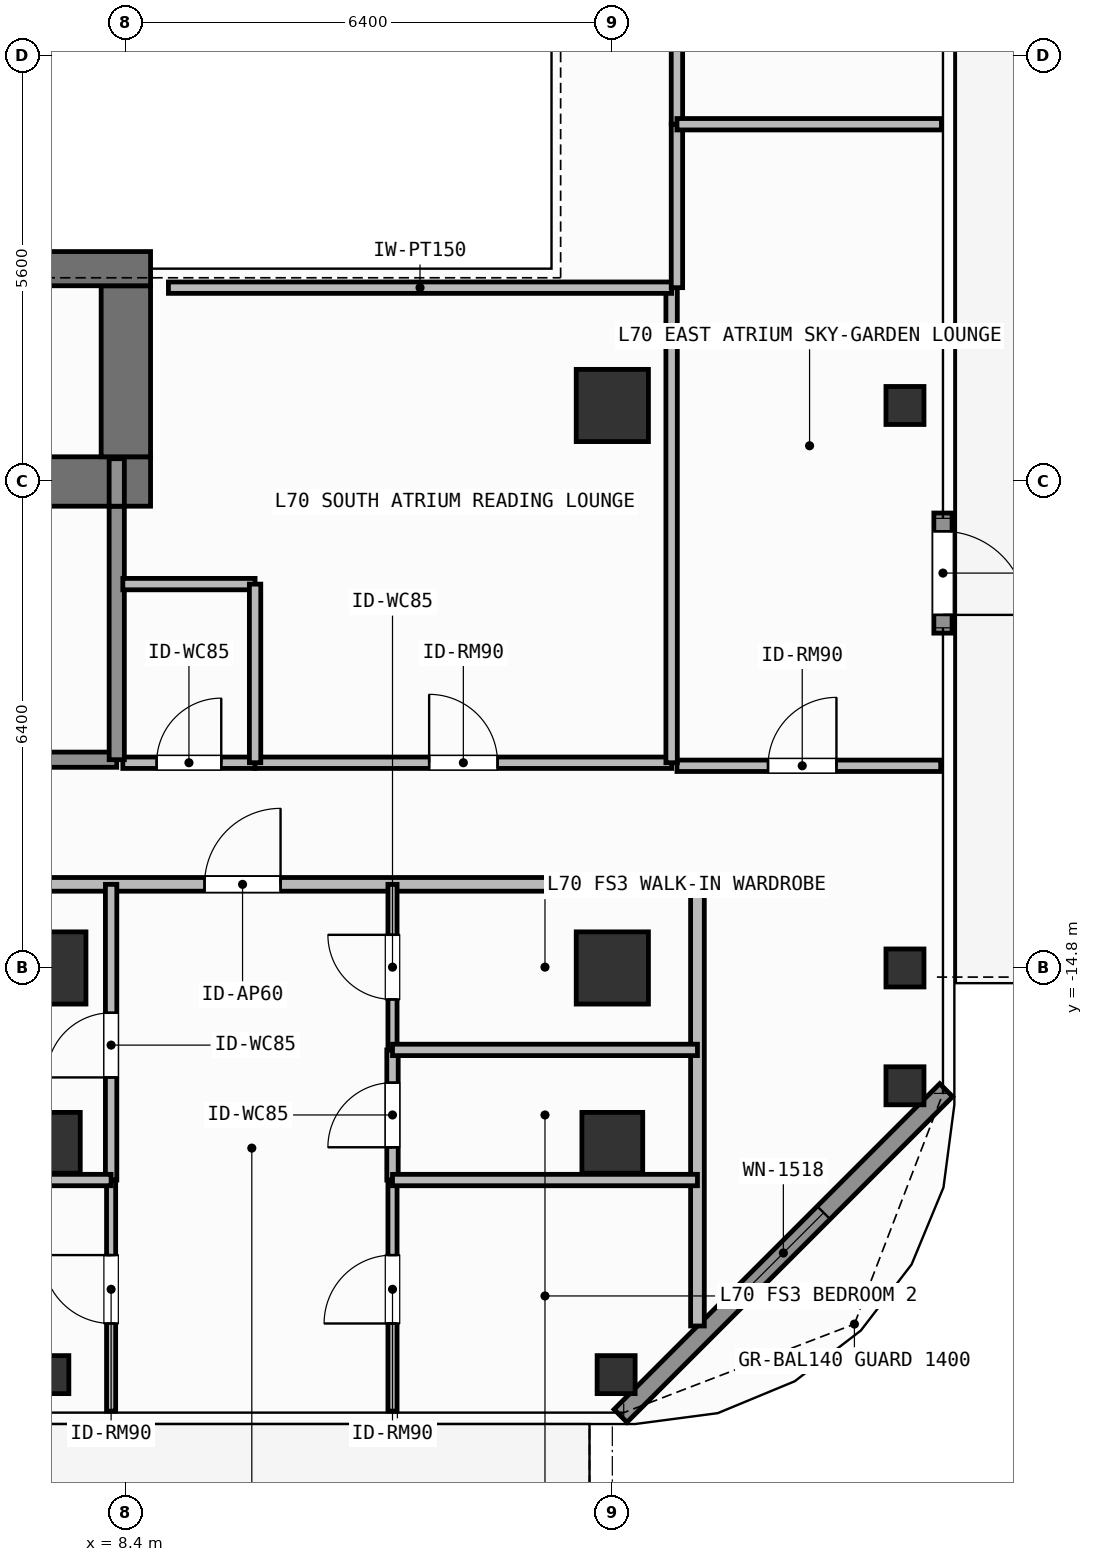
"""IFC4 building model, lengths in metres.
Left out: names, types, materials, properties, quantities, classifications, styles, units other than length and angle.
Written with IfcOpenShell. Run it as: python <this file> out.ifc"""

import sys

from ifc_helpers import new_model, si_unit, direction, frame, frame_2d, origin, origin_2d, place, context, subcontext, project, spatial, rectangle, hollow_rectangle, extrude, element, fill, save


model = new_model("IFC4")
c1 = context("Model", 3, precision=1e-05, world=origin(), true_north=direction((0.0, 1.0)))
c2 = subcontext(c1, "Body", "Model", "MODEL_VIEW")
j1 = project(units=[si_unit("LENGTHUNIT", "METRE"), si_unit("PLANEANGLEUNIT", "RADIAN")], contexts=[c1])
p1 = place(None, origin())
s1 = spatial("IfcSite", under=j1, at=p1, CompositionType="ELEMENT")
p2 = place(p1, origin())
s2 = spatial("IfcBuilding", under=s1, at=p2, CompositionType="ELEMENT")
p3 = place(p2, frame((0.0, 0.0, 285.9)))
s3 = spatial("IfcBuildingStorey", under=s2, at=p3, CompositionType="ELEMENT", Elevation=285.9)
p4 = place(p3, frame((6.12, -8.4, 0.0), z_axis=(0.0, 0.0, 1.0), x_axis=(1.0, 0.0, 0.0)))
e1 = element("IfcWall", 1, at=p4, inside=s3, PredefinedType="SHEAR", context=c2, shape_type="SweptSolid", body=[
    extrude(rectangle(XDim=2.605, YDim=0.65, at=frame_2d((1.302, 0.0))), origin(), (0.0, 0.0, 1.0), 3.9),
])
p5 = place(p3, frame((8.4, -8.075, 0.0), z_axis=(0.0, 0.0, 1.0), x_axis=(0.0, 1.0, 0.0)))
e2 = element("IfcWall", 2, at=p5, inside=s3, PredefinedType="SHEAR", context=c2, shape_type="SweptSolid", body=[
    extrude(rectangle(XDim=2.25, YDim=0.65, at=frame_2d((1.125, 0.0))), origin(), (0.0, 0.0, 1.0), 3.9),
])
p6 = place(p3, frame((3.045, -5.6, 0.0), z_axis=(0.0, 0.0, 1.0), x_axis=(1.0, 0.0, 0.0)))
e3 = element("IfcWall", 3, at=p6, inside=s3, PredefinedType="SHEAR", context=c2, shape_type="SweptSolid", body=[
    extrude(rectangle(XDim=5.68, YDim=0.45, at=frame_2d((2.84, 0.0))), origin(), (0.0, 0.0, 1.0), 3.9),
])
for number, where, z_axis, x_axis in (
    (4, (7.4, -14.8, 0.0), (0.0, 0.0, 1.0), (1.0, 0.0, 0.0)),
    (5, (14.8, -14.8, 0.0), (0.0, 0.0, 1.0), (1.0, 0.0, 0.0)),
    (6, (14.8, -7.4, 0.0), (0.0, 0.0, 1.0), (1.0, 0.0, 0.0)),
):
    element("IfcColumn", number, at=place(p3, frame(where, z_axis=z_axis, x_axis=x_axis)), inside=s3, PredefinedType="COLUMN", context=c2, shape_type="SweptSolid", body=[
        extrude(rectangle(XDim=0.95, YDim=0.95, at=origin_2d()), origin(), (0.0, 0.0, 1.0), 3.9),
    ])
for number, where, z_axis, x_axis in (
    (7, (7.4, -17.1, 0.0), (0.0, 0.0, 1.0), (1.0, 0.0, 0.0)),
    (8, (14.8, -17.1, 0.0), (0.0, 0.0, 1.0), (1.0, 0.0, 0.0)),
):
    element("IfcColumn", number, at=place(p3, frame(where, z_axis=z_axis, x_axis=x_axis)), inside=s3, PredefinedType="COLUMN", context=c2, shape_type="SweptSolid", body=[
        extrude(hollow_rectangle(XDim=0.8, YDim=0.8, WallThickness=0.036, at=origin_2d()), origin(), (0.0, 0.0, 1.0), 3.9),
    ])
for number, where, z_axis, x_axis in (
    (9, (14.85, -20.15, 0.0), (0.0, 0.0, 1.0), (1.0, 0.0, 0.0)),
    (10, (18.65, -16.35, 0.0), (0.0, 0.0, 1.0), (1.0, 0.0, 0.0)),
    (11, (7.4, -20.15, 0.0), (0.0, 0.0, 1.0), (1.0, 0.0, 0.0)),
    (12, (18.65, -14.8, 0.0), (0.0, 0.0, 1.0), (1.0, 0.0, 0.0)),
    (13, (18.65, -7.4, 0.0), (0.0, 0.0, 1.0), (1.0, 0.0, 0.0)),
):
    element("IfcColumn", number, at=place(p3, frame(where, z_axis=z_axis, x_axis=x_axis)), inside=s3, PredefinedType="COLUMN", context=c2, shape_type="SweptSolid", body=[
        extrude(hollow_rectangle(XDim=0.5, YDim=0.5, WallThickness=0.025, at=origin_2d()), origin(), (0.0, 0.0, 1.0), 3.9),
    ])
p7 = place(p3, frame((19.15, -8.815, 0.0), z_axis=(0.0, 0.0, 1.0), x_axis=(0.0, -1.0, 0.0)))
e14 = element("IfcWall", 14, at=p7, inside=s3, PredefinedType="SOLIDWALL", context=c2, shape_type="SweptSolid", body=[
    extrude(rectangle(XDim=1.58, YDim=0.24, at=frame_2d((0.79, 0.0))), origin(), (0.0, 0.0, 1.0), 3.68),
])
p8 = place(p7, frame((0.24, 0.0, 0.0)))
e15 = element("IfcOpeningElement", 15, at=p8, cuts=e14, PredefinedType="OPENING", context=c2, shape_type="SweptSolid", body=[
    extrude(rectangle(XDim=1.1, YDim=2.2, at=frame_2d((0.55, 1.1))), frame((0.0, 0.13, 0.0), z_axis=(0.0, -1.0, 0.0), x_axis=(1.0, 0.0, 0.0)), (0.0, 0.0, 1.0), 0.26),
])
p9 = place(p3, frame((19.192, -16.408, 0.0), z_axis=(0.0, 0.0, 1.0), x_axis=(-0.707106781187, -0.707106781187, 0.0)))
e16 = element("IfcWall", 16, at=p9, inside=s3, PredefinedType="SOLIDWALL", context=c2, shape_type="SweptSolid", body=[
    extrude(rectangle(XDim=6.059, YDim=0.24, at=frame_2d((3.03, 0.0))), origin(), (0.0, 0.0, 1.0), 3.68),
])
p10 = place(p9, frame((2.28, 0.0, 0.8)))
e17 = element("IfcOpeningElement", 17, at=p10, cuts=e16, PredefinedType="OPENING", context=c2, shape_type="SweptSolid", body=[
    extrude(rectangle(XDim=1.5, YDim=1.85, at=frame_2d((0.75, 0.925))), frame((0.0, 0.13, 0.0), z_axis=(0.0, -1.0, 0.0), x_axis=(1.0, 0.0, 0.0)), (0.0, 0.0, 1.0), 0.26),
])
p11 = place(p3, frame((4.58, -12.06, 0.0), z_axis=(0.0, 0.0, 1.0), x_axis=(1.0, 0.0, 0.0)))
e18 = element("IfcWall", 18, at=p11, inside=s3, PredefinedType="SOLIDWALL", context=c2, shape_type="SweptSolid", body=[
    extrude(rectangle(XDim=3.7, YDim=0.2, at=frame_2d((1.85, 0.0))), origin(), (0.0, 0.0, 1.0), 3.68),
])
p12 = place(p11, frame((1.212, 0.0, 0.0)))
e19 = element("IfcOpeningElement", 19, at=p12, cuts=e18, PredefinedType="OPENING", context=c2, shape_type="SweptSolid", body=[
    extrude(rectangle(XDim=1.1, YDim=2.15, at=frame_2d((0.55, 1.075))), frame((0.0, 0.11, 0.0), z_axis=(0.0, -1.0, 0.0), x_axis=(1.0, 0.0, 0.0)), (0.0, 0.0, 1.0), 0.22),
])
p13 = place(p3, frame((8.36, -12.1, 0.0), z_axis=(0.0, 0.0, 1.0), x_axis=(1.0, 0.0, 0.0)))
e20 = element("IfcWall", 20, at=p13, inside=s3, PredefinedType="PARTITIONING", context=c2, shape_type="SweptSolid", body=[
    extrude(rectangle(XDim=1.74, YDim=0.15, at=frame_2d((0.87, 0.0))), origin(), (0.0, 0.0, 1.0), 3.68),
])
p14 = place(p13, frame((0.445, 0.0, 0.0)))
e21 = element("IfcOpeningElement", 21, at=p14, cuts=e20, PredefinedType="OPENING", context=c2, shape_type="SweptSolid", body=[
    extrude(rectangle(XDim=0.85, YDim=2.1, at=frame_2d((0.425, 1.05))), frame((0.0, 0.085, 0.0), z_axis=(0.0, -1.0, 0.0), x_axis=(1.0, 0.0, 0.0)), (0.0, 0.0, 1.0), 0.17),
])
p15 = place(p3, frame((10.1, -12.1, 0.0), z_axis=(0.0, 0.0, 1.0), x_axis=(1.0, 0.0, 0.0)))
e22 = element("IfcWall", 22, at=p15, inside=s3, PredefinedType="PARTITIONING", context=c2, shape_type="SweptSolid", body=[
    extrude(rectangle(XDim=5.48, YDim=0.15, at=frame_2d((2.74, 0.0))), origin(), (0.0, 0.0, 1.0), 3.68),
])
p16 = place(p15, frame((2.29, 0.0, 0.0)))
e23 = element("IfcOpeningElement", 23, at=p16, cuts=e22, PredefinedType="OPENING", context=c2, shape_type="SweptSolid", body=[
    extrude(rectangle(XDim=0.9, YDim=2.1, at=frame_2d((0.45, 1.05))), frame((0.0, 0.085, 0.0), z_axis=(0.0, -1.0, 0.0), x_axis=(1.0, 0.0, 0.0)), (0.0, 0.0, 1.0), 0.17),
])
p17 = place(p3, frame((3.063, -13.7, 0.0), z_axis=(0.0, 0.0, 1.0), x_axis=(1.0, 0.0, 0.0)))
e24 = element("IfcWall", 24, at=p17, inside=s3, PredefinedType="PARTITIONING", context=c2, shape_type="SweptSolid", body=[
    extrude(rectangle(XDim=12.857, YDim=0.18, at=frame_2d((6.428, 0.0))), origin(), (0.0, 0.0, 1.0), 3.68),
])
p18 = place(p17, frame((6.372, 0.0, 0.0)))
e25 = element("IfcOpeningElement", 25, at=p18, cuts=e24, PredefinedType="OPENING", context=c2, shape_type="SweptSolid", body=[
    extrude(rectangle(XDim=1.0, YDim=2.2, at=frame_2d((0.5, 1.1))), frame((0.0, 0.1, 0.0), z_axis=(0.0, -1.0, 0.0), x_axis=(1.0, 0.0, 0.0)), (0.0, 0.0, 1.0), 0.2),
])
p19 = place(p3, frame((8.206, -17.59, 0.0), z_axis=(0.0, 0.0, 1.0), x_axis=(0.0, 1.0, 0.0)))
e26 = element("IfcWall", 26, at=p19, inside=s3, PredefinedType="PARTITIONING", context=c2, shape_type="SweptSolid", body=[
    extrude(rectangle(XDim=3.89, YDim=0.15, at=frame_2d((1.945, 0.0))), origin(), (0.0, 0.0, 1.0), 3.68),
])
p20 = place(p19, frame((1.35, 0.0, 0.0)))
e27 = element("IfcOpeningElement", 27, at=p20, cuts=e26, PredefinedType="OPENING", context=c2, shape_type="SweptSolid", body=[
    extrude(rectangle(XDim=0.85, YDim=2.1, at=frame_2d((0.425, 1.05))), frame((0.0, 0.085, 0.0), z_axis=(0.0, -1.0, 0.0), x_axis=(1.0, 0.0, 0.0)), (0.0, 0.0, 1.0), 0.17),
])
p21 = place(p3, frame((8.206, -20.63, 0.0), z_axis=(0.0, 0.0, 1.0), x_axis=(0.0, 1.0, 0.0)))
e28 = element("IfcWall", 28, at=p21, inside=s3, PredefinedType="PARTITIONING", context=c2, shape_type="SweptSolid", body=[
    extrude(rectangle(XDim=3.04, YDim=0.12, at=frame_2d((1.52, 0.0))), origin(), (0.0, 0.0, 1.0), 3.68),
])
p22 = place(p21, frame((1.153, 0.0, 0.0)))
e29 = element("IfcOpeningElement", 29, at=p22, cuts=e28, PredefinedType="OPENING", context=c2, shape_type="SweptSolid", body=[
    extrude(rectangle(XDim=0.9, YDim=2.1, at=frame_2d((0.45, 1.05))), frame((0.0, 0.07, 0.0), z_axis=(0.0, -1.0, 0.0), x_axis=(1.0, 0.0, 0.0)), (0.0, 0.0, 1.0), 0.14),
])
p23 = place(p3, frame((11.908, -17.59, 0.0), z_axis=(0.0, 0.0, 1.0), x_axis=(0.0, 1.0, 0.0)))
e30 = element("IfcWall", 30, at=p23, inside=s3, PredefinedType="PARTITIONING", context=c2, shape_type="SweptSolid", body=[
    extrude(rectangle(XDim=1.712, YDim=0.15, at=frame_2d((0.856, 0.0))), origin(), (0.0, 0.0, 1.0), 3.68),
])
p24 = place(p23, frame((0.431, 0.0, 0.0)))
e31 = element("IfcOpeningElement", 31, at=p24, cuts=e30, PredefinedType="OPENING", context=c2, shape_type="SweptSolid", body=[
    extrude(rectangle(XDim=0.85, YDim=2.1, at=frame_2d((0.425, 1.05))), frame((0.0, 0.085, 0.0), z_axis=(0.0, -1.0, 0.0), x_axis=(1.0, 0.0, 0.0)), (0.0, 0.0, 1.0), 0.17),
])
p25 = place(p3, frame((11.908, -15.878, 0.0), z_axis=(0.0, 0.0, 1.0), x_axis=(0.0, 1.0, 0.0)))
e32 = element("IfcWall", 32, at=p25, inside=s3, PredefinedType="PARTITIONING", context=c2, shape_type="SweptSolid", body=[
    extrude(rectangle(XDim=2.178, YDim=0.12, at=frame_2d((1.089, 0.0))), origin(), (0.0, 0.0, 1.0), 3.68),
])
p26 = place(p25, frame((0.664, 0.0, 0.0)))
e33 = element("IfcOpeningElement", 33, at=p26, cuts=e32, PredefinedType="OPENING", context=c2, shape_type="SweptSolid", body=[
    extrude(rectangle(XDim=0.85, YDim=2.1, at=frame_2d((0.425, 1.05))), frame((0.0, 0.07, 0.0), z_axis=(0.0, -1.0, 0.0), x_axis=(1.0, 0.0, 0.0)), (0.0, 0.0, 1.0), 0.14),
])
p27 = place(p3, frame((11.908, -20.63, 0.0), z_axis=(0.0, 0.0, 1.0), x_axis=(0.0, 1.0, 0.0)))
e34 = element("IfcWall", 34, at=p27, inside=s3, PredefinedType="PARTITIONING", context=c2, shape_type="SweptSolid", body=[
    extrude(rectangle(XDim=3.04, YDim=0.12, at=frame_2d((1.52, 0.0))), origin(), (0.0, 0.0, 1.0), 3.68),
])
p28 = place(p27, frame((1.153, 0.0, 0.0)))
e35 = element("IfcOpeningElement", 35, at=p28, cuts=e34, PredefinedType="OPENING", context=c2, shape_type="SweptSolid", body=[
    extrude(rectangle(XDim=0.9, YDim=2.1, at=frame_2d((0.45, 1.05))), frame((0.0, 0.07, 0.0), z_axis=(0.0, -1.0, 0.0), x_axis=(1.0, 0.0, 0.0)), (0.0, 0.0, 1.0), 0.14),
])
p29 = place(p3, frame((15.65, -12.14, 0.0), z_axis=(0.0, 0.0, 1.0), x_axis=(1.0, 0.0, 0.0)))
e36 = element("IfcWall", 36, at=p29, inside=s3, PredefinedType="PARTITIONING", context=c2, shape_type="SweptSolid", body=[
    extrude(rectangle(XDim=3.47, YDim=0.15, at=frame_2d((1.735, 0.0))), origin(), (0.0, 0.0, 1.0), 3.68),
])
p30 = place(p29, frame((1.198, 0.0, 0.0)))
e37 = element("IfcOpeningElement", 37, at=p30, cuts=e36, PredefinedType="OPENING", context=c2, shape_type="SweptSolid", body=[
    extrude(rectangle(XDim=0.9, YDim=2.1, at=frame_2d((0.45, 1.05))), frame((0.0, 0.085, 0.0), z_axis=(0.0, -1.0, 0.0), x_axis=(1.0, 0.0, 0.0)), (0.0, 0.0, 1.0), 0.17),
])
p31 = place(p3, frame((8.28, -12.06, 0.0), z_axis=(0.0, 0.0, 1.0), x_axis=(0.0, 1.0, 0.0)))
e38 = element("IfcWall", 38, at=p31, inside=s3, PredefinedType="SOLIDWALL", context=c2, shape_type="SweptSolid", body=[
    extrude(rectangle(XDim=3.335, YDim=0.2, at=frame_2d((1.667, 0.0))), origin(), (0.0, 0.0, 1.0), 3.68),
])
p32 = place(p3, frame((8.28, -8.725, 0.0), z_axis=(0.0, 0.0, 1.0), x_axis=(0.0, 1.0, 0.0)))
e39 = element("IfcWall", 39, at=p32, inside=s3, PredefinedType="SOLIDWALL", context=c2, shape_type="SweptSolid", body=[
    extrude(rectangle(XDim=0.625, YDim=0.2, at=frame_2d((0.312, 0.0))), origin(), (0.0, 0.0, 1.0), 3.68),
])
p33 = place(p3, frame((8.36, -9.75, 0.0), z_axis=(0.0, 0.0, 1.0), x_axis=(1.0, 0.0, 0.0)))
e40 = element("IfcWall", 40, at=p33, inside=s3, PredefinedType="PARTITIONING", context=c2, shape_type="SweptSolid", body=[
    extrude(rectangle(XDim=1.74, YDim=0.15, at=frame_2d((0.87, 0.0))), origin(), (0.0, 0.0, 1.0), 3.68),
])
p34 = place(p3, frame((10.1, -12.1, 0.0), z_axis=(0.0, 0.0, 1.0), x_axis=(0.0, 1.0, 0.0)))
e41 = element("IfcWall", 41, at=p34, inside=s3, PredefinedType="PARTITIONING", context=c2, shape_type="SweptSolid", body=[
    extrude(rectangle(XDim=2.35, YDim=0.15, at=frame_2d((1.175, 0.0))), origin(), (0.0, 0.0, 1.0), 3.68),
])
p35 = place(p3, frame((15.58, -12.1, 0.0), z_axis=(0.0, 0.0, 1.0), x_axis=(0.0, 1.0, 0.0)))
e42 = element("IfcWall", 42, at=p35, inside=s3, PredefinedType="PARTITIONING", context=c2, shape_type="SweptSolid", body=[
    extrude(rectangle(XDim=6.25, YDim=0.15, at=frame_2d((3.125, 0.0))), origin(), (0.0, 0.0, 1.0), 3.68),
])
p36 = place(p3, frame((8.96, -5.85, 0.0), z_axis=(0.0, 0.0, 1.0), x_axis=(1.0, 0.0, 0.0)))
e43 = element("IfcWall", 43, at=p36, inside=s3, PredefinedType="PARTITIONING", context=c2, shape_type="SweptSolid", body=[
    extrude(rectangle(XDim=6.62, YDim=0.15, at=frame_2d((3.31, 0.0))), origin(), (0.0, 0.0, 1.0), 3.68),
])
p37 = place(p3, frame((15.92, -19.51, 0.0), z_axis=(0.0, 0.0, 1.0), x_axis=(0.0, 1.0, 0.0)))
e44 = element("IfcWall", 44, at=p37, inside=s3, PredefinedType="PARTITIONING", context=c2, shape_type="SweptSolid", body=[
    extrude(rectangle(XDim=5.81, YDim=0.18, at=frame_2d((2.905, 0.0))), origin(), (0.0, 0.0, 1.0), 3.68),
])
p38 = place(p3, frame((3.063, -17.59, 0.0), z_axis=(0.0, 0.0, 1.0), x_axis=(1.0, 0.0, 0.0)))
e45 = element("IfcWall", 45, at=p38, inside=s3, PredefinedType="PARTITIONING", context=c2, shape_type="SweptSolid", body=[
    extrude(rectangle(XDim=5.143, YDim=0.15, at=frame_2d((2.572, 0.0))), origin(), (0.0, 0.0, 1.0), 3.68),
])
for number, where, z_axis, x_axis in (
    (46, (11.908, -15.878, 0.0), (0.0, 0.0, 1.0), (1.0, 0.0, 0.0)),
    (47, (11.908, -17.59, 0.0), (0.0, 0.0, 1.0), (1.0, 0.0, 0.0)),
):
    element("IfcWall", number, at=place(p3, frame(where, z_axis=z_axis, x_axis=x_axis)), inside=s3, PredefinedType="PARTITIONING", context=c2, shape_type="SweptSolid", body=[
        extrude(rectangle(XDim=4.012, YDim=0.15, at=frame_2d((2.006, 0.0))), origin(), (0.0, 0.0, 1.0), 3.68),
    ])
p39 = place(p3, frame((15.65, -5.85, 0.0), z_axis=(0.0, 0.0, 1.0), x_axis=(0.0, 1.0, 0.0)))
e48 = element("IfcWall", 48, at=p39, inside=s3, PredefinedType="PARTITIONING", context=c2, shape_type="SweptSolid", body=[
    extrude(rectangle(XDim=2.15, YDim=0.15, at=frame_2d((1.075, 0.0))), origin(), (0.0, 0.0, 1.0), 3.68),
])
p40 = place(p3, frame((15.65, -3.7, 0.0), z_axis=(0.0, 0.0, 1.0), x_axis=(0.0, 1.0, 0.0)))
e49 = element("IfcWall", 49, at=p40, inside=s3, PredefinedType="PARTITIONING", context=c2, shape_type="SweptSolid", body=[
    extrude(rectangle(XDim=9.55, YDim=0.15, at=frame_2d((4.775, 0.0))), origin(), (0.0, 0.0, 1.0), 3.68),
])
p41 = place(p3, frame((15.65, -3.7, 0.0), z_axis=(0.0, 0.0, 1.0), x_axis=(1.0, 0.0, 0.0)))
e50 = element("IfcWall", 50, at=p41, inside=s3, PredefinedType="PARTITIONING", context=c2, shape_type="SweptSolid", body=[
    extrude(rectangle(XDim=3.48, YDim=0.15, at=frame_2d((1.74, 0.0))), origin(), (0.0, 0.0, 1.0), 3.68),
])
p42 = place(p8, origin())
e51 = element("IfcDoor", 51, at=p42, inside=s3, OperationType="SINGLE_SWING_RIGHT", PredefinedType="DOOR", context=c2, shape_type="SweptSolid", body=[
    extrude(rectangle(XDim=1.1, YDim=2.2, at=frame_2d((0.55, 1.1))), frame((0.0, 0.025, 0.0), z_axis=(0.0, -1.0, 0.0), x_axis=(1.0, 0.0, 0.0)), (0.0, 0.0, 1.0), 0.05),
])
fill(e15, e51)
p43 = place(p10, origin())
e52 = element("IfcWindow", 52, at=p43, inside=s3, PartitioningType="SINGLE_PANEL", PredefinedType="WINDOW", context=c2, shape_type="SweptSolid", body=[
    extrude(rectangle(XDim=1.5, YDim=1.85, at=frame_2d((0.75, 0.925))), frame((0.0, 0.03, 0.0), z_axis=(0.0, -1.0, 0.0), x_axis=(1.0, 0.0, 0.0)), (0.0, 0.0, 1.0), 0.06),
])
fill(e17, e52)
p44 = place(p14, origin())
e53 = element("IfcDoor", 53, at=p44, inside=s3, OperationType="SINGLE_SWING_RIGHT", PredefinedType="DOOR", context=c2, shape_type="SweptSolid", body=[
    extrude(rectangle(XDim=0.85, YDim=2.1, at=frame_2d((0.425, 1.05))), frame((0.0, 0.025, 0.0), z_axis=(0.0, -1.0, 0.0), x_axis=(1.0, 0.0, 0.0)), (0.0, 0.0, 1.0), 0.05),
])
fill(e21, e53)
p45 = place(p16, origin())
e54 = element("IfcDoor", 54, at=p45, inside=s3, OperationType="SINGLE_SWING_LEFT", PredefinedType="DOOR", context=c2, shape_type="SweptSolid", body=[
    extrude(rectangle(XDim=0.9, YDim=2.1, at=frame_2d((0.45, 1.05))), frame((0.0, 0.025, 0.0), z_axis=(0.0, -1.0, 0.0), x_axis=(1.0, 0.0, 0.0)), (0.0, 0.0, 1.0), 0.05),
])
fill(e23, e54)
p46 = place(p18, origin())
e55 = element("IfcDoor", 55, at=p46, inside=s3, OperationType="SINGLE_SWING_RIGHT", PredefinedType="DOOR", context=c2, shape_type="SweptSolid", body=[
    extrude(rectangle(XDim=1.0, YDim=2.2, at=frame_2d((0.5, 1.1))), frame((0.0, 0.025, 0.0), z_axis=(0.0, -1.0, 0.0), x_axis=(1.0, 0.0, 0.0)), (0.0, 0.0, 1.0), 0.05),
])
fill(e25, e55)
p47 = place(p20, origin())
e56 = element("IfcDoor", 56, at=p47, inside=s3, OperationType="SINGLE_SWING_LEFT", PredefinedType="DOOR", context=c2, shape_type="SweptSolid", body=[
    extrude(rectangle(XDim=0.85, YDim=2.1, at=frame_2d((0.425, 1.05))), frame((0.0, 0.025, 0.0), z_axis=(0.0, -1.0, 0.0), x_axis=(1.0, 0.0, 0.0)), (0.0, 0.0, 1.0), 0.05),
])
fill(e27, e56)
p48 = place(p22, origin())
e57 = element("IfcDoor", 57, at=p48, inside=s3, OperationType="SINGLE_SWING_RIGHT", PredefinedType="DOOR", context=c2, shape_type="SweptSolid", body=[
    extrude(rectangle(XDim=0.9, YDim=2.1, at=frame_2d((0.45, 1.05))), frame((0.0, 0.025, 0.0), z_axis=(0.0, -1.0, 0.0), x_axis=(1.0, 0.0, 0.0)), (0.0, 0.0, 1.0), 0.05),
])
fill(e29, e57)
p49 = place(p24, origin())
e58 = element("IfcDoor", 58, at=p49, inside=s3, OperationType="SINGLE_SWING_LEFT", PredefinedType="DOOR", context=c2, shape_type="SweptSolid", body=[
    extrude(rectangle(XDim=0.85, YDim=2.1, at=frame_2d((0.425, 1.05))), frame((0.0, 0.025, 0.0), z_axis=(0.0, -1.0, 0.0), x_axis=(1.0, 0.0, 0.0)), (0.0, 0.0, 1.0), 0.05),
])
fill(e31, e58)
p50 = place(p26, origin())
e59 = element("IfcDoor", 59, at=p50, inside=s3, OperationType="SINGLE_SWING_RIGHT", PredefinedType="DOOR", context=c2, shape_type="SweptSolid", body=[
    extrude(rectangle(XDim=0.85, YDim=2.1, at=frame_2d((0.425, 1.05))), frame((0.0, 0.025, 0.0), z_axis=(0.0, -1.0, 0.0), x_axis=(1.0, 0.0, 0.0)), (0.0, 0.0, 1.0), 0.05),
])
fill(e33, e59)
p51 = place(p28, origin())
e60 = element("IfcDoor", 60, at=p51, inside=s3, OperationType="SINGLE_SWING_LEFT", PredefinedType="DOOR", context=c2, shape_type="SweptSolid", body=[
    extrude(rectangle(XDim=0.9, YDim=2.1, at=frame_2d((0.45, 1.05))), frame((0.0, 0.025, 0.0), z_axis=(0.0, -1.0, 0.0), x_axis=(1.0, 0.0, 0.0)), (0.0, 0.0, 1.0), 0.05),
])
fill(e35, e60)
p52 = place(p30, origin())
e61 = element("IfcDoor", 61, at=p52, inside=s3, OperationType="SINGLE_SWING_RIGHT", PredefinedType="DOOR", context=c2, shape_type="SweptSolid", body=[
    extrude(rectangle(XDim=0.9, YDim=2.1, at=frame_2d((0.45, 1.05))), frame((0.0, 0.025, 0.0), z_axis=(0.0, -1.0, 0.0), x_axis=(1.0, 0.0, 0.0)), (0.0, 0.0, 1.0), 0.05),
])
fill(e37, e61)
save(model, sys.argv[1])
